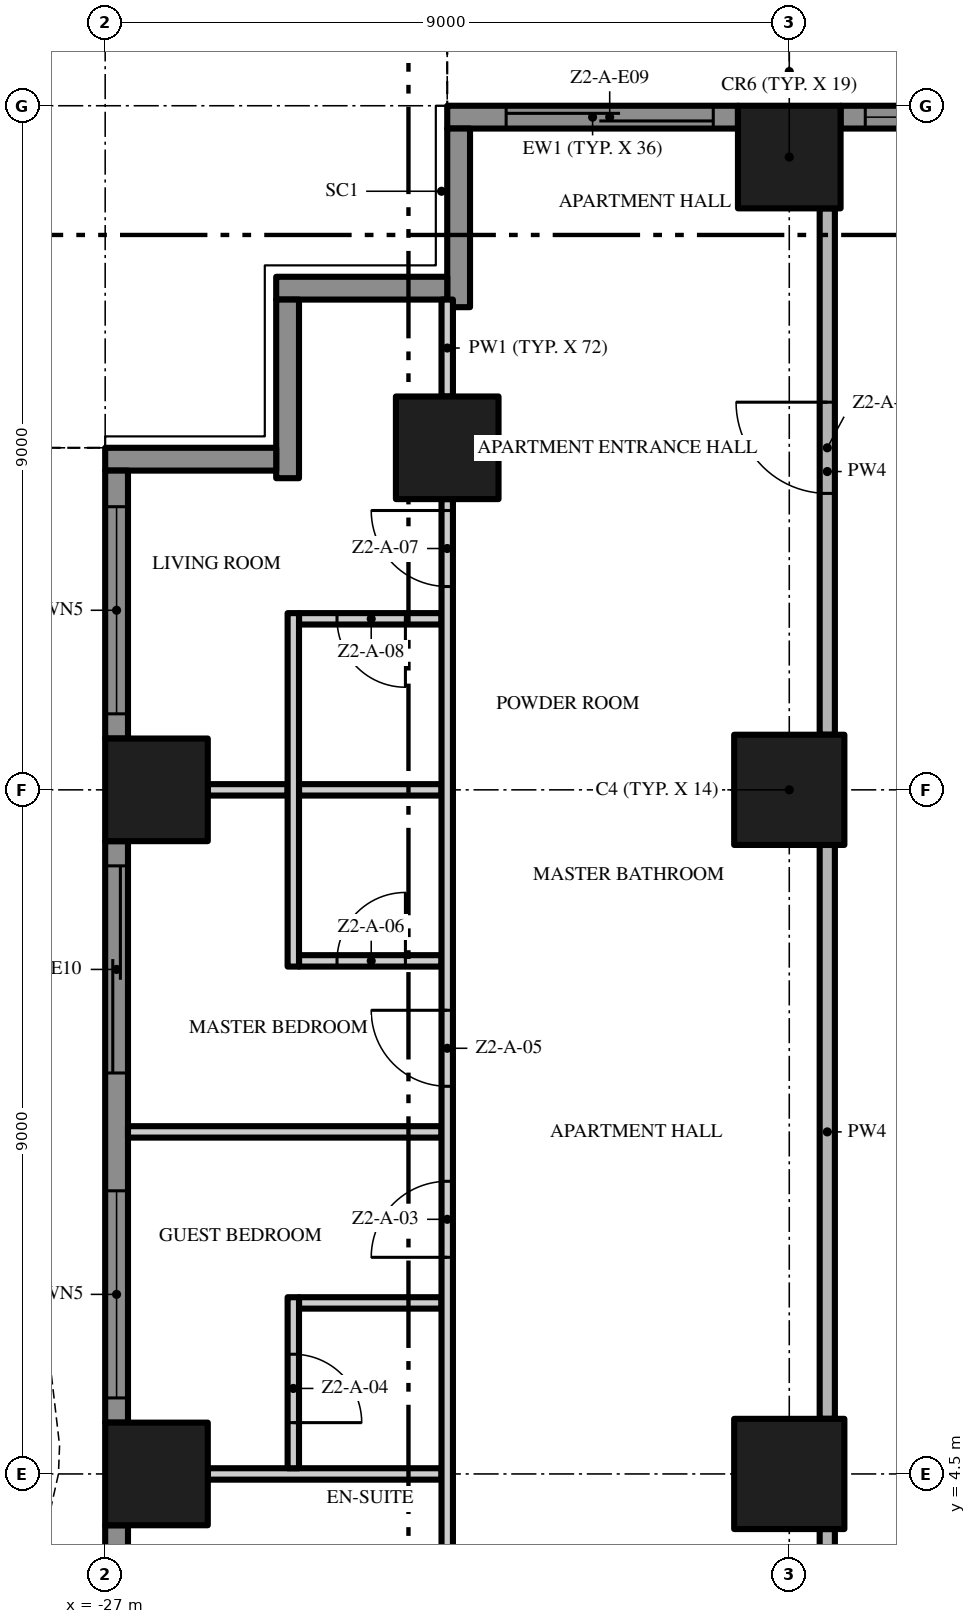
"""IFC4 building model, lengths in metres.
Left out: names, types, materials, properties, quantities, classifications, styles, units other than length and angle.
Written with IfcOpenShell. Run it as: python <this file> out.ifc"""

import sys

from ifc_helpers import new_model, si_unit, direction, frame, frame_2d, origin, origin_2d, place, context, subcontext, project, spatial, polyline, rectangle, outline, extrude, element, fill, save


model = new_model("IFC4")
c1 = context("Model", 3, precision=1e-05, world=origin(), true_north=direction((0.0, 1.0)))
c2 = subcontext(c1, "Body", "Model", "MODEL_VIEW")
j1 = project(units=[si_unit("LENGTHUNIT", "METRE"), si_unit("PLANEANGLEUNIT", "RADIAN")], contexts=[c1])
p1 = place(None, origin())
s1 = spatial("IfcSite", under=j1, at=p1, CompositionType="ELEMENT")
p2 = place(p1, origin())
s2 = spatial("IfcBuilding", under=s1, at=p2, CompositionType="ELEMENT")
p3 = place(p2, frame((0.0, 0.0, 73.2)))
s3 = spatial("IfcBuildingStorey", under=s2, at=p3, CompositionType="ELEMENT", Elevation=73.2)
p4 = place(p3, frame((-18.0, 13.5, 0.0), z_axis=(0.0, 0.0, 1.0), x_axis=(1.0, 0.0, 0.0)))
e1 = element("IfcColumn", 1, at=p4, inside=s3, PredefinedType="COLUMN", context=c2, shape_type="SweptSolid", body=[
    extrude(rectangle(XDim=1.45, YDim=1.45, at=origin_2d()), origin(), (0.0, 0.0, 1.0), 3.5),
])
p5 = place(p3, frame((-18.0, 21.825, 0.0), z_axis=(0.0, 0.0, 1.0), x_axis=(1.0, 0.0, 0.0)))
e2 = element("IfcColumn", 2, at=p5, inside=s3, PredefinedType="COLUMN", context=c2, shape_type="SweptSolid", body=[
    extrude(rectangle(XDim=1.35, YDim=1.35, at=origin_2d()), origin(), (0.0, 0.0, 1.0), 3.5),
])
p6 = place(p3, frame((-18.0, 4.5, 0.0), z_axis=(0.0, 0.0, 1.0), x_axis=(1.0, 0.0, 0.0)))
e3 = element("IfcColumn", 3, at=p6, inside=s3, PredefinedType="COLUMN", context=c2, shape_type="SweptSolid", body=[
    extrude(rectangle(XDim=1.45, YDim=1.45, at=origin_2d()), origin(), (0.0, 0.0, 1.0), 3.5),
])
for number, where, z_axis, x_axis in (
    (4, (-26.325, 13.5, 0.0), (0.0, 0.0, 1.0), (1.0, 0.0, 0.0)),
    (5, (-22.5, 18.0, 0.0), (0.0, 0.0, 1.0), (1.0, 0.0, 0.0)),
    (6, (-26.325, 4.5, 0.0), (0.0, 0.0, 1.0), (1.0, 0.0, 0.0)),
):
    element("IfcColumn", number, at=place(p3, frame(where, z_axis=z_axis, x_axis=x_axis)), inside=s3, PredefinedType="COLUMN", context=c2, shape_type="SweptSolid", body=[
        extrude(rectangle(XDim=1.35, YDim=1.35, at=origin_2d()), origin(), (0.0, 0.0, 1.0), 3.5),
    ])
p7 = place(p3, frame((-17.325, 22.35, 0.0), z_axis=(0.0, 0.0, 1.0), x_axis=(1.0, 0.0, 0.0)))
e7 = element("IfcWall", 7, at=p7, inside=s3, PredefinedType="SOLIDWALL", context=c2, shape_type="SweptSolid", body=[
    extrude(rectangle(XDim=3.825, YDim=0.3, at=frame_2d((1.913, 0.0))), origin(), (0.0, 0.0, 1.0), 3.5),
])
p8 = place(p7, frame((0.325, 0.0, 0.45)))
e8 = element("IfcOpeningElement", 8, at=p8, cuts=e7, PredefinedType="OPENING", context=c2, shape_type="SweptSolid", body=[
    extrude(rectangle(XDim=2.725, YDim=2.65, at=frame_2d((1.363, 1.325))), frame((0.0, 0.16, 0.0), z_axis=(0.0, -1.0, 0.0), x_axis=(1.0, 0.0, 0.0)), (0.0, 0.0, 1.0), 0.32),
])
p9 = place(p3, frame((-22.5, 22.35, 0.0), z_axis=(0.0, 0.0, 1.0), x_axis=(1.0, 0.0, 0.0)))
e9 = element("IfcWall", 9, at=p9, inside=s3, PredefinedType="SOLIDWALL", context=c2, shape_type="SweptSolid", body=[
    extrude(rectangle(XDim=3.825, YDim=0.3, at=frame_2d((1.913, 0.0))), origin(), (0.0, 0.0, 1.0), 3.5),
])
p10 = place(p9, frame((0.775, 0.0, 0.0)))
e10 = element("IfcOpeningElement", 10, at=p10, cuts=e9, PredefinedType="OPENING", context=c2, shape_type="SweptSolid", body=[
    extrude(rectangle(XDim=2.725, YDim=2.4, at=frame_2d((1.363, 1.2))), frame((0.0, 0.16, 0.0), z_axis=(0.0, -1.0, 0.0), x_axis=(1.0, 0.0, 0.0)), (0.0, 0.0, 1.0), 0.32),
])
p11 = place(p3, frame((-22.35, 19.85, 0.0), z_axis=(0.0, 0.0, 1.0), x_axis=(0.0, 1.0, 0.0)))
e11 = element("IfcWall", 11, at=p11, inside=s3, PredefinedType="SOLIDWALL", context=c2, shape_type="SweptSolid", body=[
    extrude(rectangle(XDim=2.35, YDim=0.3, at=frame_2d((1.175, 0.0))), origin(), (0.0, 0.0, 1.0), 3.5),
])
p12 = place(p3, frame((-24.75, 20.1, 0.0), z_axis=(0.0, 0.0, 1.0), x_axis=(1.0, 0.0, 0.0)))
e12 = element("IfcWall", 12, at=p12, inside=s3, PredefinedType="SOLIDWALL", context=c2, shape_type="SweptSolid", body=[
    extrude(rectangle(XDim=2.25, YDim=0.3, at=frame_2d((1.125, 0.0))), origin(), (0.0, 0.0, 1.0), 3.5),
])
p13 = place(p3, frame((-24.6, 17.6, 0.0), z_axis=(0.0, 0.0, 1.0), x_axis=(0.0, 1.0, 0.0)))
e13 = element("IfcWall", 13, at=p13, inside=s3, PredefinedType="SOLIDWALL", context=c2, shape_type="SweptSolid", body=[
    extrude(rectangle(XDim=2.35, YDim=0.3, at=frame_2d((1.175, 0.0))), origin(), (0.0, 0.0, 1.0), 3.5),
])
p14 = place(p3, frame((-27.0, 17.85, 0.0), z_axis=(0.0, 0.0, 1.0), x_axis=(1.0, 0.0, 0.0)))
e14 = element("IfcWall", 14, at=p14, inside=s3, PredefinedType="SOLIDWALL", context=c2, shape_type="SweptSolid", body=[
    extrude(rectangle(XDim=2.25, YDim=0.3, at=frame_2d((1.125, 0.0))), origin(), (0.0, 0.0, 1.0), 3.5),
])
p15 = place(p3, frame((-26.85, 14.175, 0.0), z_axis=(0.0, 0.0, 1.0), x_axis=(0.0, 1.0, 0.0)))
e15 = element("IfcWall", 15, at=p15, inside=s3, PredefinedType="SOLIDWALL", context=c2, shape_type="SweptSolid", body=[
    extrude(rectangle(XDim=3.525, YDim=0.3, at=frame_2d((1.762, 0.0))), origin(), (0.0, 0.0, 1.0), 3.5),
])
p16 = place(p15, frame((0.325, 0.0, 0.45)))
e16 = element("IfcOpeningElement", 16, at=p16, cuts=e15, PredefinedType="OPENING", context=c2, shape_type="SweptSolid", body=[
    extrude(rectangle(XDim=2.725, YDim=2.65, at=frame_2d((1.363, 1.325))), frame((0.0, 0.16, 0.0), z_axis=(0.0, -1.0, 0.0), x_axis=(1.0, 0.0, 0.0)), (0.0, 0.0, 1.0), 0.32),
])
p17 = place(p3, frame((-26.85, 5.175, 0.0), z_axis=(0.0, 0.0, 1.0), x_axis=(0.0, 1.0, 0.0)))
e17 = element("IfcWall", 17, at=p17, inside=s3, PredefinedType="SOLIDWALL", context=c2, shape_type="SweptSolid", body=[
    extrude(rectangle(XDim=7.65, YDim=0.3, at=frame_2d((3.825, 0.0))), origin(), (0.0, 0.0, 1.0), 3.5),
])
p18 = place(p17, frame((4.6, 0.0, 0.0)))
e18 = element("IfcOpeningElement", 18, at=p18, cuts=e17, PredefinedType="OPENING", context=c2, shape_type="SweptSolid", body=[
    extrude(rectangle(XDim=2.725, YDim=2.4, at=frame_2d((1.363, 1.2))), frame((0.0, 0.16, 0.0), z_axis=(0.0, -1.0, 0.0), x_axis=(1.0, 0.0, 0.0)), (0.0, 0.0, 1.0), 0.32),
])
p19 = place(p17, frame((0.325, 0.0, 0.45)))
e19 = element("IfcOpeningElement", 19, at=p19, cuts=e17, PredefinedType="OPENING", context=c2, shape_type="SweptSolid", body=[
    extrude(rectangle(XDim=2.725, YDim=2.65, at=frame_2d((1.363, 1.325))), frame((0.0, 0.16, 0.0), z_axis=(0.0, -1.0, 0.0), x_axis=(1.0, 0.0, 0.0)), (0.0, 0.0, 1.0), 0.32),
])
p20 = place(p3, frame((-26.85, -3.825, 0.0), z_axis=(0.0, 0.0, 1.0), x_axis=(0.0, 1.0, 0.0)))
e20 = element("IfcWall", 20, at=p20, inside=s3, PredefinedType="SOLIDWALL", context=c2, shape_type="SweptSolid", body=[
    extrude(rectangle(XDim=7.65, YDim=0.3, at=frame_2d((3.825, 0.0))), origin(), (0.0, 0.0, 1.0), 3.5),
])
p21 = place(p20, frame((4.6, 0.0, 0.45)))
e21 = element("IfcOpeningElement", 21, at=p21, cuts=e20, PredefinedType="OPENING", context=c2, shape_type="SweptSolid", body=[
    extrude(rectangle(XDim=2.725, YDim=2.65, at=frame_2d((1.363, 1.325))), frame((0.0, 0.16, 0.0), z_axis=(0.0, -1.0, 0.0), x_axis=(1.0, 0.0, 0.0)), (0.0, 0.0, 1.0), 0.32),
])
p22 = place(p20, frame((0.325, 0.0, 0.0)))
e22 = element("IfcOpeningElement", 22, at=p22, cuts=e20, PredefinedType="OPENING", context=c2, shape_type="SweptSolid", body=[
    extrude(rectangle(XDim=2.725, YDim=2.4, at=frame_2d((1.363, 1.2))), frame((0.0, 0.16, 0.0), z_axis=(0.0, -1.0, 0.0), x_axis=(1.0, 0.0, 0.0)), (0.0, 0.0, 1.0), 0.32),
])
p23 = place(p3, origin())
e23 = element("IfcWall", 23, at=p23, inside=s3, PredefinedType="USERDEFINED", context=c2, shape_type="SweptSolid", body=[
    extrude(outline(polyline([(-27.951, 18.0), (-28.612, 16.5), (-29.345, 15.0), (-29.869, 13.5), (-30.0, 12.375), (-29.985, 12.0), (-29.649, 10.5), (-28.988, 9.0), (-28.255, 7.5), (-27.731, 6.0), (-27.6, 4.875), (-27.615, 4.5), (-27.951, 3.0), (-28.612, 1.5), (-29.345, 0.0), (-29.869, -1.5), (-30.0, -2.625), (-29.985, -3.0), (-29.649, -4.5), (-28.988, -6.0), (-28.255, -7.5), (-27.731, -9.0), (-27.6, -10.125), (-27.615, -10.5), (-27.951, -12.0), (-28.612, -13.5), (-29.345, -15.0), (-29.869, -16.5), (-30.0, -17.625), (-29.985, -18.0), (-29.735, -17.99), (-29.749, -17.635), (-29.624, -16.556), (-29.114, -15.096), (-28.385, -13.605), (-27.713, -12.079), (-27.366, -10.533), (-27.349, -10.115), (-27.486, -8.944), (-28.024, -7.404), (-28.761, -5.895), (-29.41, -4.421), (-29.736, -2.967), (-29.749, -2.635), (-29.624, -1.556), (-29.114, -0.096), (-28.385, 1.395), (-27.713, 2.921), (-27.366, 4.467), (-27.349, 4.885), (-27.486, 6.056), (-28.024, 7.596), (-28.761, 9.105), (-29.41, 10.579), (-29.736, 12.033), (-29.749, 12.365), (-29.624, 13.444), (-29.114, 14.904), (-28.385, 16.395), (-27.723, 17.899), (-27.951, 18.0)])), origin(), (0.0, 0.0, 1.0), 0.9),
])
p24 = place(p3, frame((-25.65, 4.5, 0.0), z_axis=(0.0, 0.0, 1.0), x_axis=(1.0, 0.0, 0.0)))
e24 = element("IfcWall", 24, at=p24, inside=s3, PredefinedType="PARTITIONING", context=c2, shape_type="SweptSolid", body=[
    extrude(rectangle(XDim=3.075, YDim=0.15, at=frame_2d((1.538, 0.0))), origin(), (0.0, 0.0, 1.0), 3.5),
])
p25 = place(p3, frame((-24.45, 6.75, 0.0), z_axis=(0.0, 0.0, 1.0), x_axis=(1.0, 0.0, 0.0)))
e25 = element("IfcWall", 25, at=p25, inside=s3, PredefinedType="PARTITIONING", context=c2, shape_type="SweptSolid", body=[
    extrude(rectangle(XDim=1.875, YDim=0.15, at=frame_2d((0.938, 0.0))), origin(), (0.0, 0.0, 1.0), 3.5),
])
p26 = place(p3, frame((-26.7, 9.0, 0.0), z_axis=(0.0, 0.0, 1.0), x_axis=(1.0, 0.0, 0.0)))
e26 = element("IfcWall", 26, at=p26, inside=s3, PredefinedType="PARTITIONING", context=c2, shape_type="SweptSolid", body=[
    extrude(rectangle(XDim=4.125, YDim=0.15, at=frame_2d((2.062, 0.0))), origin(), (0.0, 0.0, 1.0), 3.5),
])
p27 = place(p3, frame((-24.45, 11.25, 0.0), z_axis=(0.0, 0.0, 1.0), x_axis=(1.0, 0.0, 0.0)))
e27 = element("IfcWall", 27, at=p27, inside=s3, PredefinedType="PARTITIONING", context=c2, shape_type="SweptSolid", body=[
    extrude(rectangle(XDim=1.875, YDim=0.15, at=frame_2d((0.938, 0.0))), origin(), (0.0, 0.0, 1.0), 3.5),
])
p28 = place(p27, frame((0.5, 0.0, 0.0)))
e28 = element("IfcOpeningElement", 28, at=p28, cuts=e27, PredefinedType="OPENING", context=c2, shape_type="SweptSolid", body=[
    extrude(rectangle(XDim=0.9, YDim=2.1, at=frame_2d((0.45, 1.05))), frame((0.0, 0.085, 0.0), z_axis=(0.0, -1.0, 0.0), x_axis=(1.0, 0.0, 0.0)), (0.0, 0.0, 1.0), 0.17),
])
p29 = place(p3, frame((-25.65, 13.5, 0.0), z_axis=(0.0, 0.0, 1.0), x_axis=(1.0, 0.0, 0.0)))
e29 = element("IfcWall", 29, at=p29, inside=s3, PredefinedType="PARTITIONING", context=c2, shape_type="SweptSolid", body=[
    extrude(rectangle(XDim=1.05, YDim=0.15, at=frame_2d((0.525, 0.0))), origin(), (0.0, 0.0, 1.0), 3.5),
])
p30 = place(p3, frame((-24.45, 13.5, 0.0), z_axis=(0.0, 0.0, 1.0), x_axis=(1.0, 0.0, 0.0)))
e30 = element("IfcWall", 30, at=p30, inside=s3, PredefinedType="PARTITIONING", context=c2, shape_type="SweptSolid", body=[
    extrude(rectangle(XDim=1.875, YDim=0.15, at=frame_2d((0.938, 0.0))), origin(), (0.0, 0.0, 1.0), 3.5),
])
p31 = place(p3, frame((-22.575, 15.75, 0.0), z_axis=(0.0, 0.0, 1.0), x_axis=(-1.0, 0.0, 0.0)))
e31 = element("IfcWall", 31, at=p31, inside=s3, PredefinedType="PARTITIONING", context=c2, shape_type="SweptSolid", body=[
    extrude(rectangle(XDim=1.875, YDim=0.15, at=frame_2d((0.938, 0.0))), origin(), (0.0, 0.0, 1.0), 3.5),
])
p32 = place(p31, frame((0.475, 0.0, 0.0)))
e32 = element("IfcOpeningElement", 32, at=p32, cuts=e31, PredefinedType="OPENING", context=c2, shape_type="SweptSolid", body=[
    extrude(rectangle(XDim=0.9, YDim=2.1, at=frame_2d((0.45, 1.05))), frame((0.0, 0.085, 0.0), z_axis=(0.0, -1.0, 0.0), x_axis=(1.0, 0.0, 0.0)), (0.0, 0.0, 1.0), 0.17),
])
p33 = place(p3, frame((-24.525, 6.825, 0.0), z_axis=(0.0, 0.0, 1.0), x_axis=(0.0, -1.0, 0.0)))
e33 = element("IfcWall", 33, at=p33, inside=s3, PredefinedType="PARTITIONING", context=c2, shape_type="SweptSolid", body=[
    extrude(rectangle(XDim=2.25, YDim=0.15, at=frame_2d((1.125, 0.0))), origin(), (0.0, 0.0, 1.0), 3.5),
])
p34 = place(p33, frame((0.75, 0.0, 0.0)))
e34 = element("IfcOpeningElement", 34, at=p34, cuts=e33, PredefinedType="OPENING", context=c2, shape_type="SweptSolid", body=[
    extrude(rectangle(XDim=0.9, YDim=2.1, at=frame_2d((0.45, 1.05))), frame((0.0, 0.085, 0.0), z_axis=(0.0, -1.0, 0.0), x_axis=(1.0, 0.0, 0.0)), (0.0, 0.0, 1.0), 0.17),
])
p35 = place(p3, frame((-24.525, 11.175, 0.0), z_axis=(0.0, 0.0, 1.0), x_axis=(0.0, 1.0, 0.0)))
e35 = element("IfcWall", 35, at=p35, inside=s3, PredefinedType="PARTITIONING", context=c2, shape_type="SweptSolid", body=[
    extrude(rectangle(XDim=4.65, YDim=0.15, at=frame_2d((2.325, 0.0))), origin(), (0.0, 0.0, 1.0), 3.5),
])
p36 = place(p3, frame((-22.5, 0.1, 0.0), z_axis=(0.0, 0.0, 1.0), x_axis=(0.0, 1.0, 0.0)))
e36 = element("IfcWall", 36, at=p36, inside=s3, PredefinedType="PARTITIONING", context=c2, shape_type="SweptSolid", body=[
    extrude(rectangle(XDim=17.225, YDim=0.15, at=frame_2d((8.613, 0.0))), origin(), (0.0, 0.0, 1.0), 3.5),
])
p37 = place(p36, frame((1.65, 0.0, 0.0)))
e37 = element("IfcOpeningElement", 37, at=p37, cuts=e36, PredefinedType="OPENING", context=c2, shape_type="SweptSolid", body=[
    extrude(rectangle(XDim=1.0, YDim=2.4, at=frame_2d((0.5, 1.2))), frame((0.0, 0.085, 0.0), z_axis=(0.0, -1.0, 0.0), x_axis=(1.0, 0.0, 0.0)), (0.0, 0.0, 1.0), 0.17),
])
p38 = place(p36, frame((7.25, 0.0, 0.0)))
e38 = element("IfcOpeningElement", 38, at=p38, cuts=e36, PredefinedType="OPENING", context=c2, shape_type="SweptSolid", body=[
    extrude(rectangle(XDim=1.0, YDim=2.4, at=frame_2d((0.5, 1.2))), frame((0.0, 0.085, 0.0), z_axis=(0.0, -1.0, 0.0), x_axis=(1.0, 0.0, 0.0)), (0.0, 0.0, 1.0), 0.17),
])
p39 = place(p36, frame((9.5, 0.0, 0.0)))
e39 = element("IfcOpeningElement", 39, at=p39, cuts=e36, PredefinedType="OPENING", context=c2, shape_type="SweptSolid", body=[
    extrude(rectangle(XDim=1.0, YDim=2.4, at=frame_2d((0.5, 1.2))), frame((0.0, 0.085, 0.0), z_axis=(0.0, -1.0, 0.0), x_axis=(1.0, 0.0, 0.0)), (0.0, 0.0, 1.0), 0.17),
])
p40 = place(p36, frame((16.075, 0.0, 0.0)))
e40 = element("IfcOpeningElement", 40, at=p40, cuts=e36, PredefinedType="OPENING", context=c2, shape_type="SweptSolid", body=[
    extrude(rectangle(XDim=1.0, YDim=2.4, at=frame_2d((0.5, 1.2))), frame((0.0, 0.085, 0.0), z_axis=(0.0, -1.0, 0.0), x_axis=(1.0, 0.0, 0.0)), (0.0, 0.0, 1.0), 0.17),
])
p41 = place(p3, frame((-22.5, 18.675, 0.0), z_axis=(0.0, 0.0, 1.0), x_axis=(0.0, 1.0, 0.0)))
e41 = element("IfcWall", 41, at=p41, inside=s3, PredefinedType="PARTITIONING", context=c2, shape_type="SweptSolid", body=[
    extrude(rectangle(XDim=1.275, YDim=0.15, at=frame_2d((0.637, 0.0))), origin(), (0.0, 0.0, 1.0), 3.5),
])
p42 = place(p3, frame((-17.5, -0.2, 0.0), z_axis=(0.0, 0.0, 1.0), x_axis=(0.0, 1.0, 0.0)))
e42 = element("IfcWall", 42, at=p42, inside=s3, PredefinedType="PARTITIONING", context=c2, shape_type="SweptSolid", body=[
    extrude(rectangle(XDim=3.975, YDim=0.2, at=frame_2d((1.988, 0.0))), origin(), (0.0, 0.0, 1.0), 3.5),
])
p43 = place(p3, frame((-17.5, 5.225, 0.0), z_axis=(0.0, 0.0, 1.0), x_axis=(0.0, 1.0, 0.0)))
e43 = element("IfcWall", 43, at=p43, inside=s3, PredefinedType="PARTITIONING", context=c2, shape_type="SweptSolid", body=[
    extrude(rectangle(XDim=7.55, YDim=0.2, at=frame_2d((3.775, 0.0))), origin(), (0.0, 0.0, 1.0), 3.5),
])
p44 = place(p3, frame((-17.5, 14.225, 0.0), z_axis=(0.0, 0.0, 1.0), x_axis=(0.0, 1.0, 0.0)))
e44 = element("IfcWall", 44, at=p44, inside=s3, PredefinedType="PARTITIONING", context=c2, shape_type="SweptSolid", body=[
    extrude(rectangle(XDim=6.925, YDim=0.2, at=frame_2d((3.462, 0.0))), origin(), (0.0, 0.0, 1.0), 3.5),
])
p45 = place(p44, frame((3.175, 0.0, 0.0)))
e45 = element("IfcOpeningElement", 45, at=p45, cuts=e44, PredefinedType="OPENING", context=c2, shape_type="SweptSolid", body=[
    extrude(rectangle(XDim=1.2, YDim=2.4, at=frame_2d((0.6, 1.2))), frame((0.0, 0.11, 0.0), z_axis=(0.0, -1.0, 0.0), x_axis=(1.0, 0.0, 0.0)), (0.0, 0.0, 1.0), 0.22),
])
p46 = place(p8, origin())
e46 = element("IfcWindow", 46, at=p46, inside=s3, PartitioningType="SINGLE_PANEL", PredefinedType="WINDOW", context=c2, shape_type="SweptSolid", body=[
    extrude(rectangle(XDim=2.725, YDim=2.65, at=frame_2d((1.363, 1.325))), frame((0.0, 0.03, 0.0), z_axis=(0.0, -1.0, 0.0), x_axis=(1.0, 0.0, 0.0)), (0.0, 0.0, 1.0), 0.06),
])
fill(e8, e46)
p47 = place(p10, origin())
e47 = element("IfcDoor", 47, at=p47, inside=s3, OperationType="SINGLE_SWING_LEFT", PredefinedType="DOOR", context=c2, shape_type="SweptSolid", body=[
    extrude(rectangle(XDim=2.725, YDim=2.4, at=frame_2d((1.363, 1.2))), frame((0.0, 0.025, 0.0), z_axis=(0.0, -1.0, 0.0), x_axis=(1.0, 0.0, 0.0)), (0.0, 0.0, 1.0), 0.05),
])
fill(e10, e47)
p48 = place(p16, origin())
e48 = element("IfcWindow", 48, at=p48, inside=s3, PartitioningType="SINGLE_PANEL", PredefinedType="WINDOW", context=c2, shape_type="SweptSolid", body=[
    extrude(rectangle(XDim=2.725, YDim=2.65, at=frame_2d((1.363, 1.325))), frame((0.0, 0.03, 0.0), z_axis=(0.0, -1.0, 0.0), x_axis=(1.0, 0.0, 0.0)), (0.0, 0.0, 1.0), 0.06),
])
fill(e16, e48)
p49 = place(p18, origin())
e49 = element("IfcDoor", 49, at=p49, inside=s3, OperationType="SINGLE_SWING_LEFT", PredefinedType="DOOR", context=c2, shape_type="SweptSolid", body=[
    extrude(rectangle(XDim=2.725, YDim=2.4, at=frame_2d((1.363, 1.2))), frame((0.0, 0.025, 0.0), z_axis=(0.0, -1.0, 0.0), x_axis=(1.0, 0.0, 0.0)), (0.0, 0.0, 1.0), 0.05),
])
fill(e18, e49)
p50 = place(p19, origin())
e50 = element("IfcWindow", 50, at=p50, inside=s3, PartitioningType="SINGLE_PANEL", PredefinedType="WINDOW", context=c2, shape_type="SweptSolid", body=[
    extrude(rectangle(XDim=2.725, YDim=2.65, at=frame_2d((1.363, 1.325))), frame((0.0, 0.03, 0.0), z_axis=(0.0, -1.0, 0.0), x_axis=(1.0, 0.0, 0.0)), (0.0, 0.0, 1.0), 0.06),
])
fill(e19, e50)
p51 = place(p45, origin())
e51 = element("IfcDoor", 51, at=p51, inside=s3, OperationType="SINGLE_SWING_RIGHT", PredefinedType="DOOR", context=c2, shape_type="SweptSolid", body=[
    extrude(rectangle(XDim=1.2, YDim=2.4, at=frame_2d((0.6, 1.2))), frame((0.0, 0.025, 0.0), z_axis=(0.0, -1.0, 0.0), x_axis=(1.0, 0.0, 0.0)), (0.0, 0.0, 1.0), 0.05),
])
fill(e45, e51)
p52 = place(p38, origin())
e52 = element("IfcDoor", 52, at=p52, inside=s3, OperationType="SINGLE_SWING_LEFT", PredefinedType="DOOR", context=c2, shape_type="SweptSolid", body=[
    extrude(rectangle(XDim=1.0, YDim=2.4, at=frame_2d((0.5, 1.2))), frame((0.0, 0.025, 0.0), z_axis=(0.0, -1.0, 0.0), x_axis=(1.0, 0.0, 0.0)), (0.0, 0.0, 1.0), 0.05),
])
fill(e38, e52)
p53 = place(p34, origin())
e53 = element("IfcDoor", 53, at=p53, inside=s3, OperationType="SINGLE_SWING_RIGHT", PredefinedType="DOOR", context=c2, shape_type="SweptSolid", body=[
    extrude(rectangle(XDim=0.9, YDim=2.1, at=frame_2d((0.45, 1.05))), frame((0.0, 0.025, 0.0), z_axis=(0.0, -1.0, 0.0), x_axis=(1.0, 0.0, 0.0)), (0.0, 0.0, 1.0), 0.05),
])
fill(e34, e53)
p54 = place(p39, origin())
e54 = element("IfcDoor", 54, at=p54, inside=s3, OperationType="SINGLE_SWING_RIGHT", PredefinedType="DOOR", context=c2, shape_type="SweptSolid", body=[
    extrude(rectangle(XDim=1.0, YDim=2.4, at=frame_2d((0.5, 1.2))), frame((0.0, 0.025, 0.0), z_axis=(0.0, -1.0, 0.0), x_axis=(1.0, 0.0, 0.0)), (0.0, 0.0, 1.0), 0.05),
])
fill(e39, e54)
p55 = place(p28, origin())
e55 = element("IfcDoor", 55, at=p55, inside=s3, OperationType="SINGLE_SWING_RIGHT", PredefinedType="DOOR", context=c2, shape_type="SweptSolid", body=[
    extrude(rectangle(XDim=0.9, YDim=2.1, at=frame_2d((0.45, 1.05))), frame((0.0, 0.025, 0.0), z_axis=(0.0, -1.0, 0.0), x_axis=(1.0, 0.0, 0.0)), (0.0, 0.0, 1.0), 0.05),
])
fill(e28, e55)
p56 = place(p40, origin())
e56 = element("IfcDoor", 56, at=p56, inside=s3, OperationType="SINGLE_SWING_RIGHT", PredefinedType="DOOR", context=c2, shape_type="SweptSolid", body=[
    extrude(rectangle(XDim=1.0, YDim=2.4, at=frame_2d((0.5, 1.2))), frame((0.0, 0.025, 0.0), z_axis=(0.0, -1.0, 0.0), x_axis=(1.0, 0.0, 0.0)), (0.0, 0.0, 1.0), 0.05),
])
fill(e40, e56)
p57 = place(p32, origin())
e57 = element("IfcDoor", 57, at=p57, inside=s3, OperationType="SINGLE_SWING_LEFT", PredefinedType="DOOR", context=c2, shape_type="SweptSolid", body=[
    extrude(rectangle(XDim=0.9, YDim=2.1, at=frame_2d((0.45, 1.05))), frame((0.0, 0.025, 0.0), z_axis=(0.0, -1.0, 0.0), x_axis=(1.0, 0.0, 0.0)), (0.0, 0.0, 1.0), 0.05),
])
fill(e32, e57)
save(model, sys.argv[1])
